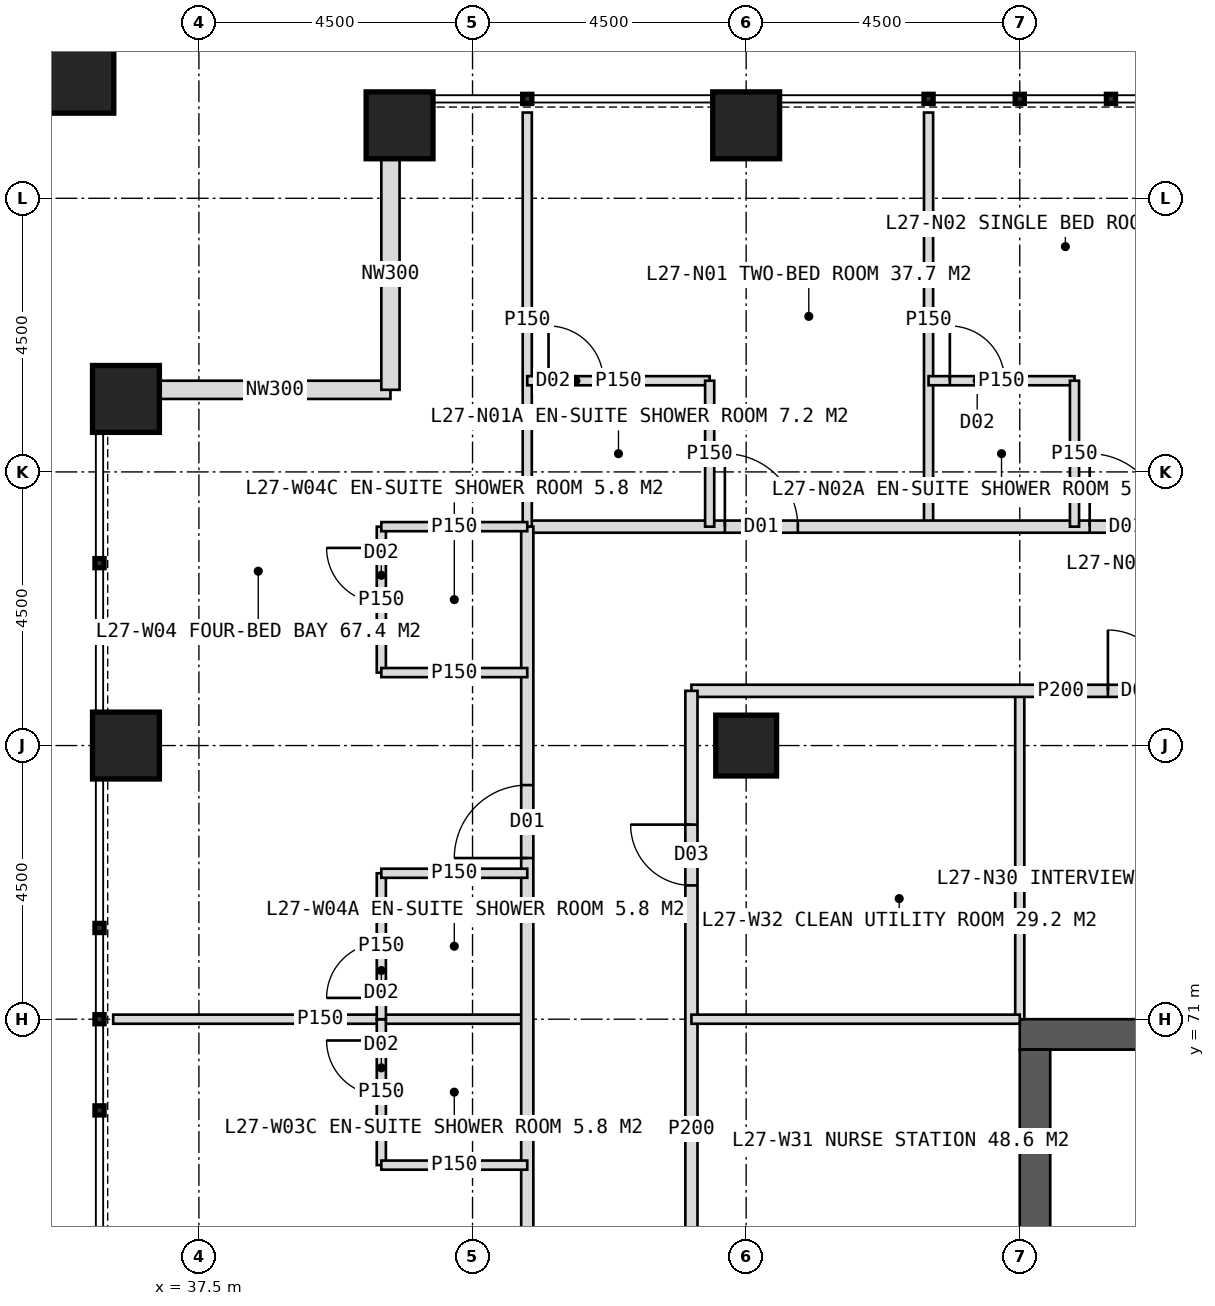
"""IFC4 building model, lengths in metres.
Left out: names, types, materials, properties, quantities, classifications, styles, units other than length and angle.
Written with IfcOpenShell. Run it as: python <this file> out.ifc"""

import sys

from ifc_helpers import new_model, si_unit, direction, frame, frame_2d, origin, origin_2d, place, context, subcontext, project, spatial, rectangle, hollow_rectangle, extrude, element, fill, save


model = new_model("IFC4")
c1 = context("Model", 3, precision=1e-05, world=origin(), true_north=direction((0.0, 1.0)))
c2 = subcontext(c1, "Body", "Model", "MODEL_VIEW")
j1 = project(units=[si_unit("LENGTHUNIT", "METRE"), si_unit("PLANEANGLEUNIT", "RADIAN")], contexts=[c1])
p1 = place(None, origin())
s1 = spatial("IfcSite", under=j1, at=p1, CompositionType="ELEMENT")
p2 = place(p1, origin())
s2 = spatial("IfcBuilding", under=s1, at=p2, CompositionType="ELEMENT")
p3 = place(p2, frame((0.0, 0.0, 116.0)))
s3 = spatial("IfcBuildingStorey", under=s2, at=p3, CompositionType="ELEMENT", Elevation=116.0)
p4 = place(p3, frame((51.0, 70.75, 0.0), z_axis=(0.0, 0.0, 1.0), x_axis=(1.0, 0.0, 0.0)))
e1 = element("IfcWall", 1, at=p4, inside=s3, PredefinedType="SHEAR", context=c2, shape_type="SweptSolid", body=[
    extrude(rectangle(XDim=18.0, YDim=0.5, at=frame_2d((9.0, 0.0))), origin(), (0.0, 0.0, 1.0), 4.0),
])
p5 = place(p4, frame((8.1, 0.0, 0.0)))
e2 = element("IfcOpeningElement", 2, at=p5, cuts=e1, PredefinedType="OPENING", context=c2, shape_type="SweptSolid", body=[
    extrude(rectangle(XDim=1.8, YDim=2.2, at=frame_2d((0.9, 1.1))), frame((0.0, 0.26, 0.0), z_axis=(0.0, -1.0, 0.0), x_axis=(1.0, 0.0, 0.0)), (0.0, 0.0, 1.0), 0.52),
])
p6 = place(p3, frame((51.25, 53.5, 0.0), z_axis=(0.0, 0.0, 1.0), x_axis=(0.0, 1.0, 0.0)))
e3 = element("IfcWall", 3, at=p6, inside=s3, PredefinedType="SHEAR", context=c2, shape_type="SweptSolid", body=[
    extrude(rectangle(XDim=17.0, YDim=0.5, at=frame_2d((8.5, 0.0))), origin(), (0.0, 0.0, 1.0), 4.0),
])
p7 = place(p6, frame((6.0, 0.0, 0.0)))
e4 = element("IfcOpeningElement", 4, at=p7, cuts=e3, PredefinedType="OPENING", context=c2, shape_type="SweptSolid", body=[
    extrude(rectangle(XDim=1.5, YDim=2.2, at=frame_2d((0.75, 1.1))), frame((0.0, 0.26, 0.0), z_axis=(0.0, -1.0, 0.0), x_axis=(1.0, 0.0, 0.0)), (0.0, 0.0, 1.0), 0.52),
])
p8 = place(p3, frame((46.5, 75.5, 0.0), z_axis=(0.0, 0.0, 1.0), x_axis=(1.0, 0.0, 0.0)))
e5 = element("IfcColumn", 5, at=p8, inside=s3, PredefinedType="COLUMN", context=c2, shape_type="SweptSolid", body=[
    extrude(hollow_rectangle(XDim=1.0, YDim=1.0, WallThickness=0.1, at=origin_2d()), origin(), (0.0, 0.0, 1.0), 4.0),
])
for number, where, z_axis, x_axis in (
    (6, (40.8, 85.7, 0.0), (0.0, 0.0, 1.0), (1.0, 0.0, 0.0)),
    (7, (46.5, 85.7, 0.0), (0.0, 0.0, 1.0), (1.0, 0.0, 0.0)),
    (8, (36.3, 75.5, 0.0), (0.0, 0.0, 1.0), (1.0, 0.0, 0.0)),
    (9, (36.3, 81.2, 0.0), (0.0, 0.0, 1.0), (1.0, 0.0, 0.0)),
):
    element("IfcColumn", number, at=place(p3, frame(where, z_axis=z_axis, x_axis=x_axis)), inside=s3, PredefinedType="COLUMN", context=c2, shape_type="SweptSolid", body=[
        extrude(hollow_rectangle(XDim=1.1, YDim=1.1, WallThickness=0.1, at=origin_2d()), origin(), (0.0, 0.0, 1.0), 4.0),
    ])
p9 = place(p3, frame((35.4, 86.6, 0.0), z_axis=(0.0, 0.0, 1.0), x_axis=(1.0, 0.0, 0.0)))
e10 = element("IfcColumn", 10, at=p9, inside=s3, PredefinedType="COLUMN", context=c2, shape_type="SweptSolid", body=[
    extrude(hollow_rectangle(XDim=1.4, YDim=1.4, WallThickness=0.08, at=origin_2d()), origin(), (0.0, 0.0, 1.0), 4.0),
])
for number, where, z_axis, x_axis in (
    (11, (36.85, 81.35, 0.0), (0.0, 0.0, 1.0), (1.0, 0.0, 0.0)),
    (12, (40.65, 81.35, 0.0), (0.0, 0.0, 1.0), (0.0, 1.0, 0.0)),
):
    element("IfcWall", number, at=place(p3, frame(where, z_axis=z_axis, x_axis=x_axis)), inside=s3, PredefinedType="ELEMENTEDWALL", context=c2, shape_type="SweptSolid", body=[
        extrude(rectangle(XDim=3.8, YDim=0.3, at=frame_2d((1.9, 0.0))), origin(), (0.0, 0.0, 1.0), 4.0),
    ])
p10 = place(p3, frame((49.5, 79.1, 0.0), z_axis=(0.0, 0.0, 1.0), x_axis=(0.0, 1.0, 0.0)))
e13 = element("IfcWall", 13, at=p10, inside=s3, PredefinedType="PARTITIONING", context=c2, shape_type="SweptSolid", body=[
    extrude(rectangle(XDim=6.81, YDim=0.15, at=frame_2d((3.405, 0.0))), origin(), (0.0, 0.0, 1.0), 3.75),
])
p11 = place(p3, frame((42.9, 79.1, 0.0), z_axis=(0.0, 0.0, 1.0), x_axis=(1.0, 0.0, 0.0)))
e14 = element("IfcWall", 14, at=p11, inside=s3, PredefinedType="PARTITIONING", context=c2, shape_type="SweptSolid", body=[
    extrude(rectangle(XDim=34.2, YDim=0.2, at=frame_2d((17.1, 0.0))), origin(), (0.0, 0.0, 1.0), 3.75),
])
p12 = place(p11, frame((3.25, 0.0, 0.0)))
e15 = element("IfcOpeningElement", 15, at=p12, cuts=e14, PredefinedType="OPENING", context=c2, shape_type="SweptSolid", body=[
    extrude(rectangle(XDim=1.2, YDim=2.2, at=frame_2d((0.6, 1.1))), frame((0.0, 0.11, 0.0), z_axis=(0.0, -1.0, 0.0), x_axis=(1.0, 0.0, 0.0)), (0.0, 0.0, 1.0), 0.22),
])
p13 = place(p11, frame((9.25, 0.0, 0.0)))
e16 = element("IfcOpeningElement", 16, at=p13, cuts=e14, PredefinedType="OPENING", context=c2, shape_type="SweptSolid", body=[
    extrude(rectangle(XDim=1.2, YDim=2.2, at=frame_2d((0.6, 1.1))), frame((0.0, 0.11, 0.0), z_axis=(0.0, -1.0, 0.0), x_axis=(1.0, 0.0, 0.0)), (0.0, 0.0, 1.0), 0.22),
])
p14 = place(p11, frame((13.75, 0.0, 0.0)))
e17 = element("IfcOpeningElement", 17, at=p14, cuts=e14, PredefinedType="OPENING", context=c2, shape_type="SweptSolid", body=[
    extrude(rectangle(XDim=1.2, YDim=2.2, at=frame_2d((0.6, 1.1))), frame((0.0, 0.11, 0.0), z_axis=(0.0, -1.0, 0.0), x_axis=(1.0, 0.0, 0.0)), (0.0, 0.0, 1.0), 0.22),
])
p15 = place(p11, frame((19.6, 0.0, 0.0)))
e18 = element("IfcOpeningElement", 18, at=p15, cuts=e14, PredefinedType="OPENING", context=c2, shape_type="SweptSolid", body=[
    extrude(rectangle(XDim=1.0, YDim=2.1, at=frame_2d((0.5, 1.05))), frame((0.0, 0.11, 0.0), z_axis=(0.0, -1.0, 0.0), x_axis=(1.0, 0.0, 0.0)), (0.0, 0.0, 1.0), 0.22),
])
p16 = place(p11, frame((27.25, 0.0, 0.0)))
e19 = element("IfcOpeningElement", 19, at=p16, cuts=e14, PredefinedType="OPENING", context=c2, shape_type="SweptSolid", body=[
    extrude(rectangle(XDim=1.2, YDim=2.2, at=frame_2d((0.6, 1.1))), frame((0.0, 0.11, 0.0), z_axis=(0.0, -1.0, 0.0), x_axis=(1.0, 0.0, 0.0)), (0.0, 0.0, 1.0), 0.22),
])
p17 = place(p3, frame((42.9, 79.1, 0.0), z_axis=(0.0, 0.0, 1.0), x_axis=(0.0, 1.0, 0.0)))
e20 = element("IfcWall", 20, at=p17, inside=s3, PredefinedType="PARTITIONING", context=c2, shape_type="SweptSolid", body=[
    extrude(rectangle(XDim=6.81, YDim=0.15, at=frame_2d((3.405, 0.0))), origin(), (0.0, 0.0, 1.0), 3.75),
])
p18 = place(p3, frame((42.9, 81.5, 0.0), z_axis=(0.0, 0.0, 1.0), x_axis=(1.0, 0.0, 0.0)))
e21 = element("IfcWall", 21, at=p18, inside=s3, PredefinedType="PARTITIONING", context=c2, shape_type="SweptSolid", body=[
    extrude(rectangle(XDim=3.0, YDim=0.15, at=frame_2d((1.5, 0.0))), origin(), (0.0, 0.0, 1.0), 3.75),
])
p19 = place(p18, frame((0.35, 0.0, 0.0)))
e22 = element("IfcOpeningElement", 22, at=p19, cuts=e21, PredefinedType="OPENING", context=c2, shape_type="SweptSolid", body=[
    extrude(rectangle(XDim=0.9, YDim=2.1, at=frame_2d((0.45, 1.05))), frame((0.0, 0.085, 0.0), z_axis=(0.0, -1.0, 0.0), x_axis=(1.0, 0.0, 0.0)), (0.0, 0.0, 1.0), 0.17),
])
p20 = place(p3, frame((45.9, 79.1, 0.0), z_axis=(0.0, 0.0, 1.0), x_axis=(0.0, 1.0, 0.0)))
e23 = element("IfcWall", 23, at=p20, inside=s3, PredefinedType="PARTITIONING", context=c2, shape_type="SweptSolid", body=[
    extrude(rectangle(XDim=2.4, YDim=0.15, at=frame_2d((1.2, 0.0))), origin(), (0.0, 0.0, 1.0), 3.75),
])
p21 = place(p3, frame((49.5, 81.5, 0.0), z_axis=(0.0, 0.0, 1.0), x_axis=(1.0, 0.0, 0.0)))
e24 = element("IfcWall", 24, at=p21, inside=s3, PredefinedType="PARTITIONING", context=c2, shape_type="SweptSolid", body=[
    extrude(rectangle(XDim=2.4, YDim=0.15, at=frame_2d((1.2, 0.0))), origin(), (0.0, 0.0, 1.0), 3.75),
])
p22 = place(p21, frame((0.35, 0.0, 0.0)))
e25 = element("IfcOpeningElement", 25, at=p22, cuts=e24, PredefinedType="OPENING", context=c2, shape_type="SweptSolid", body=[
    extrude(rectangle(XDim=0.9, YDim=2.1, at=frame_2d((0.45, 1.05))), frame((0.0, 0.085, 0.0), z_axis=(0.0, -1.0, 0.0), x_axis=(1.0, 0.0, 0.0)), (0.0, 0.0, 1.0), 0.17),
])
p23 = place(p3, frame((51.9, 79.1, 0.0), z_axis=(0.0, 0.0, 1.0), x_axis=(0.0, 1.0, 0.0)))
e26 = element("IfcWall", 26, at=p23, inside=s3, PredefinedType="PARTITIONING", context=c2, shape_type="SweptSolid", body=[
    extrude(rectangle(XDim=2.4, YDim=0.15, at=frame_2d((1.2, 0.0))), origin(), (0.0, 0.0, 1.0), 3.75),
])
p24 = place(p3, frame((51.0, 71.0, 0.0), z_axis=(0.0, 0.0, 1.0), x_axis=(0.0, 1.0, 0.0)))
e27 = element("IfcWall", 27, at=p24, inside=s3, PredefinedType="PARTITIONING", context=c2, shape_type="SweptSolid", body=[
    extrude(rectangle(XDim=5.4, YDim=0.15, at=frame_2d((2.7, 0.0))), origin(), (0.0, 0.0, 1.0), 3.75),
])
p25 = place(p3, frame((45.6, 76.4, 0.0), z_axis=(0.0, 0.0, 1.0), x_axis=(1.0, 0.0, 0.0)))
e28 = element("IfcWall", 28, at=p25, inside=s3, PredefinedType="PARTITIONING", context=c2, shape_type="SweptSolid", body=[
    extrude(rectangle(XDim=12.15, YDim=0.2, at=frame_2d((6.075, 0.0))), origin(), (0.0, 0.0, 1.0), 3.75),
])
p26 = place(p25, frame((6.85, 0.0, 0.0)))
e29 = element("IfcOpeningElement", 29, at=p26, cuts=e28, PredefinedType="OPENING", context=c2, shape_type="SweptSolid", body=[
    extrude(rectangle(XDim=1.0, YDim=2.1, at=frame_2d((0.5, 1.05))), frame((0.0, 0.11, 0.0), z_axis=(0.0, -1.0, 0.0), x_axis=(1.0, 0.0, 0.0)), (0.0, 0.0, 1.0), 0.22),
])
p27 = place(p3, frame((42.9, 71.0, 0.0), z_axis=(0.0, 0.0, 1.0), x_axis=(-1.0, 0.0, 0.0)))
e30 = element("IfcWall", 30, at=p27, inside=s3, PredefinedType="PARTITIONING", context=c2, shape_type="SweptSolid", body=[
    extrude(rectangle(XDim=6.81, YDim=0.15, at=frame_2d((3.405, 0.0))), origin(), (0.0, 0.0, 1.0), 3.75),
])
p28 = place(p3, frame((42.9, 44.9, 0.0), z_axis=(0.0, 0.0, 1.0), x_axis=(0.0, 1.0, 0.0)))
e31 = element("IfcWall", 31, at=p28, inside=s3, PredefinedType="PARTITIONING", context=c2, shape_type="SweptSolid", body=[
    extrude(rectangle(XDim=34.2, YDim=0.2, at=frame_2d((17.1, 0.0))), origin(), (0.0, 0.0, 1.0), 3.75),
])
p29 = place(p28, frame((3.25, 0.0, 0.0)))
e32 = element("IfcOpeningElement", 32, at=p29, cuts=e31, PredefinedType="OPENING", context=c2, shape_type="SweptSolid", body=[
    extrude(rectangle(XDim=1.2, YDim=2.2, at=frame_2d((0.6, 1.1))), frame((0.0, 0.11, 0.0), z_axis=(0.0, -1.0, 0.0), x_axis=(1.0, 0.0, 0.0)), (0.0, 0.0, 1.0), 0.22),
])
p30 = place(p28, frame((10.75, 0.0, 0.0)))
e33 = element("IfcOpeningElement", 33, at=p30, cuts=e31, PredefinedType="OPENING", context=c2, shape_type="SweptSolid", body=[
    extrude(rectangle(XDim=1.2, YDim=2.2, at=frame_2d((0.6, 1.1))), frame((0.0, 0.11, 0.0), z_axis=(0.0, -1.0, 0.0), x_axis=(1.0, 0.0, 0.0)), (0.0, 0.0, 1.0), 0.22),
])
p31 = place(p28, frame((19.75, 0.0, 0.0)))
e34 = element("IfcOpeningElement", 34, at=p31, cuts=e31, PredefinedType="OPENING", context=c2, shape_type="SweptSolid", body=[
    extrude(rectangle(XDim=1.2, YDim=2.2, at=frame_2d((0.6, 1.1))), frame((0.0, 0.11, 0.0), z_axis=(0.0, -1.0, 0.0), x_axis=(1.0, 0.0, 0.0)), (0.0, 0.0, 1.0), 0.22),
])
p32 = place(p28, frame((28.75, 0.0, 0.0)))
e35 = element("IfcOpeningElement", 35, at=p32, cuts=e31, PredefinedType="OPENING", context=c2, shape_type="SweptSolid", body=[
    extrude(rectangle(XDim=1.2, YDim=2.2, at=frame_2d((0.6, 1.1))), frame((0.0, 0.11, 0.0), z_axis=(0.0, -1.0, 0.0), x_axis=(1.0, 0.0, 0.0)), (0.0, 0.0, 1.0), 0.22),
])
p33 = place(p3, frame((40.5, 68.6, 0.0), z_axis=(0.0, 0.0, 1.0), x_axis=(0.0, 1.0, 0.0)))
e36 = element("IfcWall", 36, at=p33, inside=s3, PredefinedType="PARTITIONING", context=c2, shape_type="SweptSolid", body=[
    extrude(rectangle(XDim=2.4, YDim=0.15, at=frame_2d((1.2, 0.0))), origin(), (0.0, 0.0, 1.0), 3.75),
])
p34 = place(p33, frame((1.15, 0.0, 0.0)))
e37 = element("IfcOpeningElement", 37, at=p34, cuts=e36, PredefinedType="OPENING", context=c2, shape_type="SweptSolid", body=[
    extrude(rectangle(XDim=0.9, YDim=2.1, at=frame_2d((0.45, 1.05))), frame((0.0, 0.085, 0.0), z_axis=(0.0, -1.0, 0.0), x_axis=(1.0, 0.0, 0.0)), (0.0, 0.0, 1.0), 0.17),
])
p35 = place(p3, frame((42.9, 68.6, 0.0), z_axis=(0.0, 0.0, 1.0), x_axis=(-1.0, 0.0, 0.0)))
e38 = element("IfcWall", 38, at=p35, inside=s3, PredefinedType="PARTITIONING", context=c2, shape_type="SweptSolid", body=[
    extrude(rectangle(XDim=2.4, YDim=0.15, at=frame_2d((1.2, 0.0))), origin(), (0.0, 0.0, 1.0), 3.75),
])
p36 = place(p3, frame((40.5, 71.0, 0.0), z_axis=(0.0, 0.0, 1.0), x_axis=(0.0, 1.0, 0.0)))
e39 = element("IfcWall", 39, at=p36, inside=s3, PredefinedType="PARTITIONING", context=c2, shape_type="SweptSolid", body=[
    extrude(rectangle(XDim=2.4, YDim=0.15, at=frame_2d((1.2, 0.0))), origin(), (0.0, 0.0, 1.0), 3.75),
])
p37 = place(p36, frame((0.35, 0.0, 0.0)))
e40 = element("IfcOpeningElement", 40, at=p37, cuts=e39, PredefinedType="OPENING", context=c2, shape_type="SweptSolid", body=[
    extrude(rectangle(XDim=0.9, YDim=2.1, at=frame_2d((0.45, 1.05))), frame((0.0, 0.085, 0.0), z_axis=(0.0, -1.0, 0.0), x_axis=(1.0, 0.0, 0.0)), (0.0, 0.0, 1.0), 0.17),
])
p38 = place(p3, frame((42.9, 73.4, 0.0), z_axis=(0.0, 0.0, 1.0), x_axis=(-1.0, 0.0, 0.0)))
e41 = element("IfcWall", 41, at=p38, inside=s3, PredefinedType="PARTITIONING", context=c2, shape_type="SweptSolid", body=[
    extrude(rectangle(XDim=2.4, YDim=0.15, at=frame_2d((1.2, 0.0))), origin(), (0.0, 0.0, 1.0), 3.75),
])
p39 = place(p3, frame((40.5, 76.7, 0.0), z_axis=(0.0, 0.0, 1.0), x_axis=(0.0, 1.0, 0.0)))
e42 = element("IfcWall", 42, at=p39, inside=s3, PredefinedType="PARTITIONING", context=c2, shape_type="SweptSolid", body=[
    extrude(rectangle(XDim=2.4, YDim=0.15, at=frame_2d((1.2, 0.0))), origin(), (0.0, 0.0, 1.0), 3.75),
])
p40 = place(p39, frame((1.15, 0.0, 0.0)))
e43 = element("IfcOpeningElement", 43, at=p40, cuts=e42, PredefinedType="OPENING", context=c2, shape_type="SweptSolid", body=[
    extrude(rectangle(XDim=0.9, YDim=2.1, at=frame_2d((0.45, 1.05))), frame((0.0, 0.085, 0.0), z_axis=(0.0, -1.0, 0.0), x_axis=(1.0, 0.0, 0.0)), (0.0, 0.0, 1.0), 0.17),
])
for number, where, z_axis, x_axis in (
    (44, (42.9, 76.7, 0.0), (0.0, 0.0, 1.0), (-1.0, 0.0, 0.0)),
    (45, (42.9, 79.1, 0.0), (0.0, 0.0, 1.0), (-1.0, 0.0, 0.0)),
):
    element("IfcWall", number, at=place(p3, frame(where, z_axis=z_axis, x_axis=x_axis)), inside=s3, PredefinedType="PARTITIONING", context=c2, shape_type="SweptSolid", body=[
        extrude(rectangle(XDim=2.4, YDim=0.15, at=frame_2d((1.2, 0.0))), origin(), (0.0, 0.0, 1.0), 3.75),
    ])
p41 = place(p3, frame((45.6, 62.0, 0.0), z_axis=(0.0, 0.0, 1.0), x_axis=(0.0, 1.0, 0.0)))
e46 = element("IfcWall", 46, at=p41, inside=s3, PredefinedType="PARTITIONING", context=c2, shape_type="SweptSolid", body=[
    extrude(rectangle(XDim=14.4, YDim=0.2, at=frame_2d((7.2, 0.0))), origin(), (0.0, 0.0, 1.0), 3.75),
])
p42 = place(p41, frame((1.45, 0.0, 0.0)))
e47 = element("IfcOpeningElement", 47, at=p42, cuts=e46, PredefinedType="OPENING", context=c2, shape_type="SweptSolid", body=[
    extrude(rectangle(XDim=1.0, YDim=2.1, at=frame_2d((0.5, 1.05))), frame((0.0, 0.11, 0.0), z_axis=(0.0, -1.0, 0.0), x_axis=(1.0, 0.0, 0.0)), (0.0, 0.0, 1.0), 0.22),
])
p43 = place(p41, frame((11.2, 0.0, 0.0)))
e48 = element("IfcOpeningElement", 48, at=p43, cuts=e46, PredefinedType="OPENING", context=c2, shape_type="SweptSolid", body=[
    extrude(rectangle(XDim=1.0, YDim=2.1, at=frame_2d((0.5, 1.05))), frame((0.0, 0.11, 0.0), z_axis=(0.0, -1.0, 0.0), x_axis=(1.0, 0.0, 0.0)), (0.0, 0.0, 1.0), 0.22),
])
p44 = place(p3, frame((51.0, 71.0, 0.0), z_axis=(0.0, 0.0, 1.0), x_axis=(-1.0, 0.0, 0.0)))
e49 = element("IfcWall", 49, at=p44, inside=s3, PredefinedType="PARTITIONING", context=c2, shape_type="SweptSolid", body=[
    extrude(rectangle(XDim=5.4, YDim=0.15, at=frame_2d((2.7, 0.0))), origin(), (0.0, 0.0, 1.0), 3.75),
])
p45 = place(p12, origin())
e50 = element("IfcDoor", 50, at=p45, inside=s3, OperationType="SINGLE_SWING_LEFT", PredefinedType="DOOR", context=c2, shape_type="SweptSolid", body=[
    extrude(rectangle(XDim=1.2, YDim=2.2, at=frame_2d((0.6, 1.1))), frame((0.0, 0.025, 0.0), z_axis=(0.0, -1.0, 0.0), x_axis=(1.0, 0.0, 0.0)), (0.0, 0.0, 1.0), 0.05),
])
fill(e15, e50)
p46 = place(p19, origin())
e51 = element("IfcDoor", 51, at=p46, inside=s3, OperationType="SINGLE_SWING_LEFT", PredefinedType="DOOR", context=c2, shape_type="SweptSolid", body=[
    extrude(rectangle(XDim=0.9, YDim=2.1, at=frame_2d((0.45, 1.05))), frame((0.0, 0.025, 0.0), z_axis=(0.0, -1.0, 0.0), x_axis=(1.0, 0.0, 0.0)), (0.0, 0.0, 1.0), 0.05),
])
fill(e22, e51)
p47 = place(p13, origin())
e52 = element("IfcDoor", 52, at=p47, inside=s3, OperationType="SINGLE_SWING_LEFT", PredefinedType="DOOR", context=c2, shape_type="SweptSolid", body=[
    extrude(rectangle(XDim=1.2, YDim=2.2, at=frame_2d((0.6, 1.1))), frame((0.0, 0.025, 0.0), z_axis=(0.0, -1.0, 0.0), x_axis=(1.0, 0.0, 0.0)), (0.0, 0.0, 1.0), 0.05),
])
fill(e16, e52)
p48 = place(p22, origin())
e53 = element("IfcDoor", 53, at=p48, inside=s3, OperationType="SINGLE_SWING_LEFT", PredefinedType="DOOR", context=c2, shape_type="SweptSolid", body=[
    extrude(rectangle(XDim=0.9, YDim=2.1, at=frame_2d((0.45, 1.05))), frame((0.0, 0.025, 0.0), z_axis=(0.0, -1.0, 0.0), x_axis=(1.0, 0.0, 0.0)), (0.0, 0.0, 1.0), 0.05),
])
fill(e25, e53)
p49 = place(p26, origin())
e54 = element("IfcDoor", 54, at=p49, inside=s3, OperationType="SINGLE_SWING_LEFT", PredefinedType="DOOR", context=c2, shape_type="SweptSolid", body=[
    extrude(rectangle(XDim=1.0, YDim=2.1, at=frame_2d((0.5, 1.05))), frame((0.0, 0.025, 0.0), z_axis=(0.0, -1.0, 0.0), x_axis=(1.0, 0.0, 0.0)), (0.0, 0.0, 1.0), 0.05),
])
fill(e29, e54)
p50 = place(p34, origin())
e55 = element("IfcDoor", 55, at=p50, inside=s3, OperationType="SINGLE_SWING_RIGHT", PredefinedType="DOOR", context=c2, shape_type="SweptSolid", body=[
    extrude(rectangle(XDim=0.9, YDim=2.1, at=frame_2d((0.45, 1.05))), frame((0.0, 0.025, 0.0), z_axis=(0.0, -1.0, 0.0), x_axis=(1.0, 0.0, 0.0)), (0.0, 0.0, 1.0), 0.05),
])
fill(e37, e55)
p51 = place(p32, origin())
e56 = element("IfcDoor", 56, at=p51, inside=s3, OperationType="SINGLE_SWING_LEFT", PredefinedType="DOOR", context=c2, shape_type="SweptSolid", body=[
    extrude(rectangle(XDim=1.2, YDim=2.2, at=frame_2d((0.6, 1.1))), frame((0.0, 0.025, 0.0), z_axis=(0.0, -1.0, 0.0), x_axis=(1.0, 0.0, 0.0)), (0.0, 0.0, 1.0), 0.05),
])
fill(e35, e56)
p52 = place(p37, origin())
e57 = element("IfcDoor", 57, at=p52, inside=s3, OperationType="SINGLE_SWING_LEFT", PredefinedType="DOOR", context=c2, shape_type="SweptSolid", body=[
    extrude(rectangle(XDim=0.9, YDim=2.1, at=frame_2d((0.45, 1.05))), frame((0.0, 0.025, 0.0), z_axis=(0.0, -1.0, 0.0), x_axis=(1.0, 0.0, 0.0)), (0.0, 0.0, 1.0), 0.05),
])
fill(e40, e57)
p53 = place(p40, origin())
e58 = element("IfcDoor", 58, at=p53, inside=s3, OperationType="SINGLE_SWING_RIGHT", PredefinedType="DOOR", context=c2, shape_type="SweptSolid", body=[
    extrude(rectangle(XDim=0.9, YDim=2.1, at=frame_2d((0.45, 1.05))), frame((0.0, 0.025, 0.0), z_axis=(0.0, -1.0, 0.0), x_axis=(1.0, 0.0, 0.0)), (0.0, 0.0, 1.0), 0.05),
])
fill(e43, e58)
p54 = place(p43, origin())
e59 = element("IfcDoor", 59, at=p54, inside=s3, OperationType="SINGLE_SWING_RIGHT", PredefinedType="DOOR", context=c2, shape_type="SweptSolid", body=[
    extrude(rectangle(XDim=1.0, YDim=2.1, at=frame_2d((0.5, 1.05))), frame((0.0, 0.025, 0.0), z_axis=(0.0, -1.0, 0.0), x_axis=(1.0, 0.0, 0.0)), (0.0, 0.0, 1.0), 0.05),
])
fill(e48, e59)
save(model, sys.argv[1])
